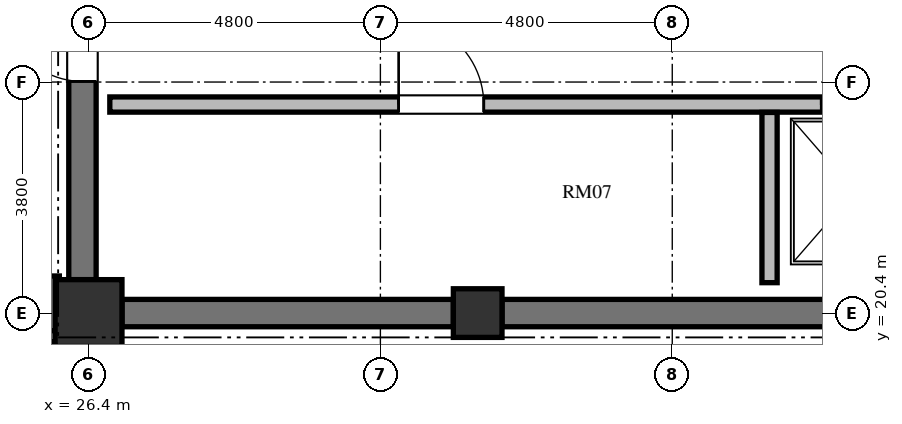
"""IFC4 building model, lengths in metres.
Left out: names, types, materials, properties, quantities, classifications, styles, units other than length and angle.
Written with IfcOpenShell. Run it as: python <this file> out.ifc"""

import sys

from ifc_helpers import new_model, si_unit, direction, frame, frame_2d, origin, origin_2d, place, context, subcontext, project, spatial, rectangle, extrude, element, fill, save


model = new_model("IFC4")
c1 = context("Model", 3, precision=1e-05, world=origin(), true_north=direction((0.0, 1.0)))
c2 = subcontext(c1, "Body", "Model", "MODEL_VIEW")
j1 = project(units=[si_unit("LENGTHUNIT", "METRE"), si_unit("PLANEANGLEUNIT", "RADIAN")], contexts=[c1])
p1 = place(None, origin())
s1 = spatial("IfcSite", under=j1, at=p1, CompositionType="ELEMENT")
p2 = place(p1, origin())
s2 = spatial("IfcBuilding", under=s1, at=p2, CompositionType="ELEMENT")
p3 = place(p2, frame((0.0, 0.0, 251.376)))
s3 = spatial("IfcBuildingStorey", under=s2, at=p3, CompositionType="ELEMENT", Elevation=251.376)
p4 = place(p3, frame((26.4, 20.4, 0.0), z_axis=(0.0, 0.0, 1.0), x_axis=(1.0, 0.0, 0.0)))
e1 = element("IfcColumn", 1, at=p4, inside=s3, PredefinedType="COLUMN", context=c2, shape_type="SweptSolid", body=[
    extrude(rectangle(XDim=1.1, YDim=1.1, at=origin_2d()), origin(), (0.0, 0.0, 1.0), 3.648),
])
p5 = place(p3, frame((32.8, 20.4, 0.0), z_axis=(0.0, 0.0, 1.0), x_axis=(1.0, 0.0, 0.0)))
e2 = element("IfcColumn", 2, at=p5, inside=s3, PredefinedType="COLUMN", context=c2, shape_type="SweptSolid", body=[
    extrude(rectangle(XDim=0.8, YDim=0.8, at=origin_2d()), origin(), (0.0, 0.0, 1.0), 3.648),
])
p6 = place(p3, frame((26.3, 20.95, 0.0), z_axis=(0.0, 0.0, 1.0), x_axis=(0.0, 1.0, 0.0)))
e3 = element("IfcWall", 3, at=p6, inside=s3, PredefinedType="SHEAR", context=c2, shape_type="SweptSolid", body=[
    extrude(rectangle(XDim=14.1, YDim=0.45, at=frame_2d((7.05, 0.0))), origin(), (0.0, 0.0, 1.0), 3.648),
])
p7 = place(p6, frame((6.5, 0.0, 0.0)))
e4 = element("IfcOpeningElement", 4, at=p7, cuts=e3, PredefinedType="OPENING", context=c2, shape_type="SweptSolid", body=[
    extrude(rectangle(XDim=1.2, YDim=2.15, at=frame_2d((0.6, 1.075))), frame((0.0, 0.235, 0.0), z_axis=(0.0, -1.0, 0.0), x_axis=(1.0, 0.0, 0.0)), (0.0, 0.0, 1.0), 0.47),
])
p8 = place(p6, frame((9.6, 0.0, 0.0)))
e5 = element("IfcOpeningElement", 5, at=p8, cuts=e3, PredefinedType="OPENING", context=c2, shape_type="SweptSolid", body=[
    extrude(rectangle(XDim=1.3, YDim=2.2, at=frame_2d((0.65, 1.1))), frame((0.0, 0.235, 0.0), z_axis=(0.0, -1.0, 0.0), x_axis=(1.0, 0.0, 0.0)), (0.0, 0.0, 1.0), 0.47),
])
p9 = place(p6, frame((3.26, 0.0, 0.0)))
e6 = element("IfcOpeningElement", 6, at=p9, cuts=e3, PredefinedType="OPENING", context=c2, shape_type="SweptSolid", body=[
    extrude(rectangle(XDim=1.3, YDim=2.2, at=frame_2d((0.65, 1.1))), frame((0.0, 0.235, 0.0), z_axis=(0.0, -1.0, 0.0), x_axis=(1.0, 0.0, 0.0)), (0.0, 0.0, 1.0), 0.47),
])
p10 = place(p3, frame((26.95, 20.4, 0.0), z_axis=(0.0, 0.0, 1.0), x_axis=(1.0, 0.0, 0.0)))
e7 = element("IfcWall", 7, at=p10, inside=s3, PredefinedType="SHEAR", context=c2, shape_type="SweptSolid", body=[
    extrude(rectangle(XDim=5.45, YDim=0.45, at=frame_2d((2.725, 0.0))), origin(), (0.0, 0.0, 1.0), 3.648),
])
p11 = place(p3, frame((33.2, 20.4, 0.0), z_axis=(0.0, 0.0, 1.0), x_axis=(1.0, 0.0, 0.0)))
e8 = element("IfcWall", 8, at=p11, inside=s3, PredefinedType="SHEAR", context=c2, shape_type="SweptSolid", body=[
    extrude(rectangle(XDim=5.6, YDim=0.45, at=frame_2d((2.8, 0.0))), origin(), (0.0, 0.0, 1.0), 3.648),
])
p12 = place(p3, frame((26.75, 23.83, 0.0), z_axis=(0.0, 0.0, 1.0), x_axis=(1.0, 0.0, 0.0)))
e9 = element("IfcWall", 9, at=p12, inside=s3, PredefinedType="SOLIDWALL", context=c2, shape_type="SweptSolid", body=[
    extrude(rectangle(XDim=16.2, YDim=0.25, at=frame_2d((8.1, 0.0))), origin(), (0.0, 0.0, 1.0), 3.448),
])
p13 = place(p12, frame((4.75, 0.0, 0.0)))
e10 = element("IfcOpeningElement", 10, at=p13, cuts=e9, PredefinedType="OPENING", context=c2, shape_type="SweptSolid", body=[
    extrude(rectangle(XDim=1.4, YDim=2.2, at=frame_2d((0.7, 1.1))), frame((0.0, 0.135, 0.0), z_axis=(0.0, -1.0, 0.0), x_axis=(1.0, 0.0, 0.0)), (0.0, 0.0, 1.0), 0.27),
])
p14 = place(p12, frame((11.7, 0.0, 0.0)))
e11 = element("IfcOpeningElement", 11, at=p14, cuts=e9, PredefinedType="OPENING", context=c2, shape_type="SweptSolid", body=[
    extrude(rectangle(XDim=1.1, YDim=2.2, at=frame_2d((0.55, 1.1))), frame((0.0, 0.135, 0.0), z_axis=(0.0, -1.0, 0.0), x_axis=(1.0, 0.0, 0.0)), (0.0, 0.0, 1.0), 0.27),
])
p15 = place(p12, frame((14.15, 0.0, 0.0)))
e12 = element("IfcOpeningElement", 12, at=p15, cuts=e9, PredefinedType="OPENING", context=c2, shape_type="SweptSolid", body=[
    extrude(rectangle(XDim=1.4, YDim=2.3, at=frame_2d((0.7, 1.15))), frame((0.0, 0.135, 0.0), z_axis=(0.0, -1.0, 0.0), x_axis=(1.0, 0.0, 0.0)), (0.0, 0.0, 1.0), 0.27),
])
p16 = place(p3, frame((37.6, 20.9, 0.0), z_axis=(0.0, 0.0, 1.0), x_axis=(0.0, 1.0, 0.0)))
e13 = element("IfcWall", 13, at=p16, inside=s3, PredefinedType="SOLIDWALL", context=c2, shape_type="SweptSolid", body=[
    extrude(rectangle(XDim=2.8, YDim=0.25, at=frame_2d((1.4, 0.0))), origin(), (0.0, 0.0, 1.0), 3.448),
])
p17 = place(p3, frame((25.83, 21.01, 0.0), z_axis=(0.0, 0.0, 1.0), x_axis=(0.0, -1.0, 0.0)))
e14 = element("IfcWall", 14, at=p17, inside=s3, PredefinedType="PARTITIONING", context=c2, shape_type="SweptSolid", body=[
    extrude(rectangle(XDim=1.03, YDim=0.18, at=frame_2d((0.515, 0.0))), origin(), (0.0, 0.0, 1.0), 3.448),
])
p18 = place(p3, frame((25.87, 20.02, 0.0), z_axis=(0.0, 0.0, 1.0), x_axis=(-1.0, 0.0, 0.0)))
e15 = element("IfcWall", 15, at=p18, inside=s3, PredefinedType="PARTITIONING", context=c2, shape_type="SweptSolid", body=[
    extrude(rectangle(XDim=2.56, YDim=0.18, at=frame_2d((1.28, 0.0))), origin(), (0.0, 0.0, 1.0), 3.448),
])
p19 = place(p9, origin())
e16 = element("IfcDoor", 16, at=p19, inside=s3, OperationType="SINGLE_SWING_RIGHT", PredefinedType="DOOR", context=c2, shape_type="SweptSolid", body=[
    extrude(rectangle(XDim=1.3, YDim=2.2, at=frame_2d((0.65, 1.1))), frame((0.0, 0.025, 0.0), z_axis=(0.0, -1.0, 0.0), x_axis=(1.0, 0.0, 0.0)), (0.0, 0.0, 1.0), 0.05),
])
fill(e6, e16)
p20 = place(p13, origin())
e17 = element("IfcDoor", 17, at=p20, inside=s3, OperationType="SINGLE_SWING_LEFT", PredefinedType="DOOR", context=c2, shape_type="SweptSolid", body=[
    extrude(rectangle(XDim=1.4, YDim=2.2, at=frame_2d((0.7, 1.1))), frame((0.0, 0.025, 0.0), z_axis=(0.0, -1.0, 0.0), x_axis=(1.0, 0.0, 0.0)), (0.0, 0.0, 1.0), 0.05),
])
fill(e10, e17)
p21 = place(p14, origin())
e18 = element("IfcDoor", 18, at=p21, inside=s3, OperationType="SLIDING_TO_LEFT", PredefinedType="DOOR", context=c2, shape_type="SweptSolid", body=[
    extrude(rectangle(XDim=1.1, YDim=2.2, at=frame_2d((0.55, 1.1))), frame((0.0, 0.025, 0.0), z_axis=(0.0, -1.0, 0.0), x_axis=(1.0, 0.0, 0.0)), (0.0, 0.0, 1.0), 0.05),
])
fill(e11, e18)
save(model, sys.argv[1])
